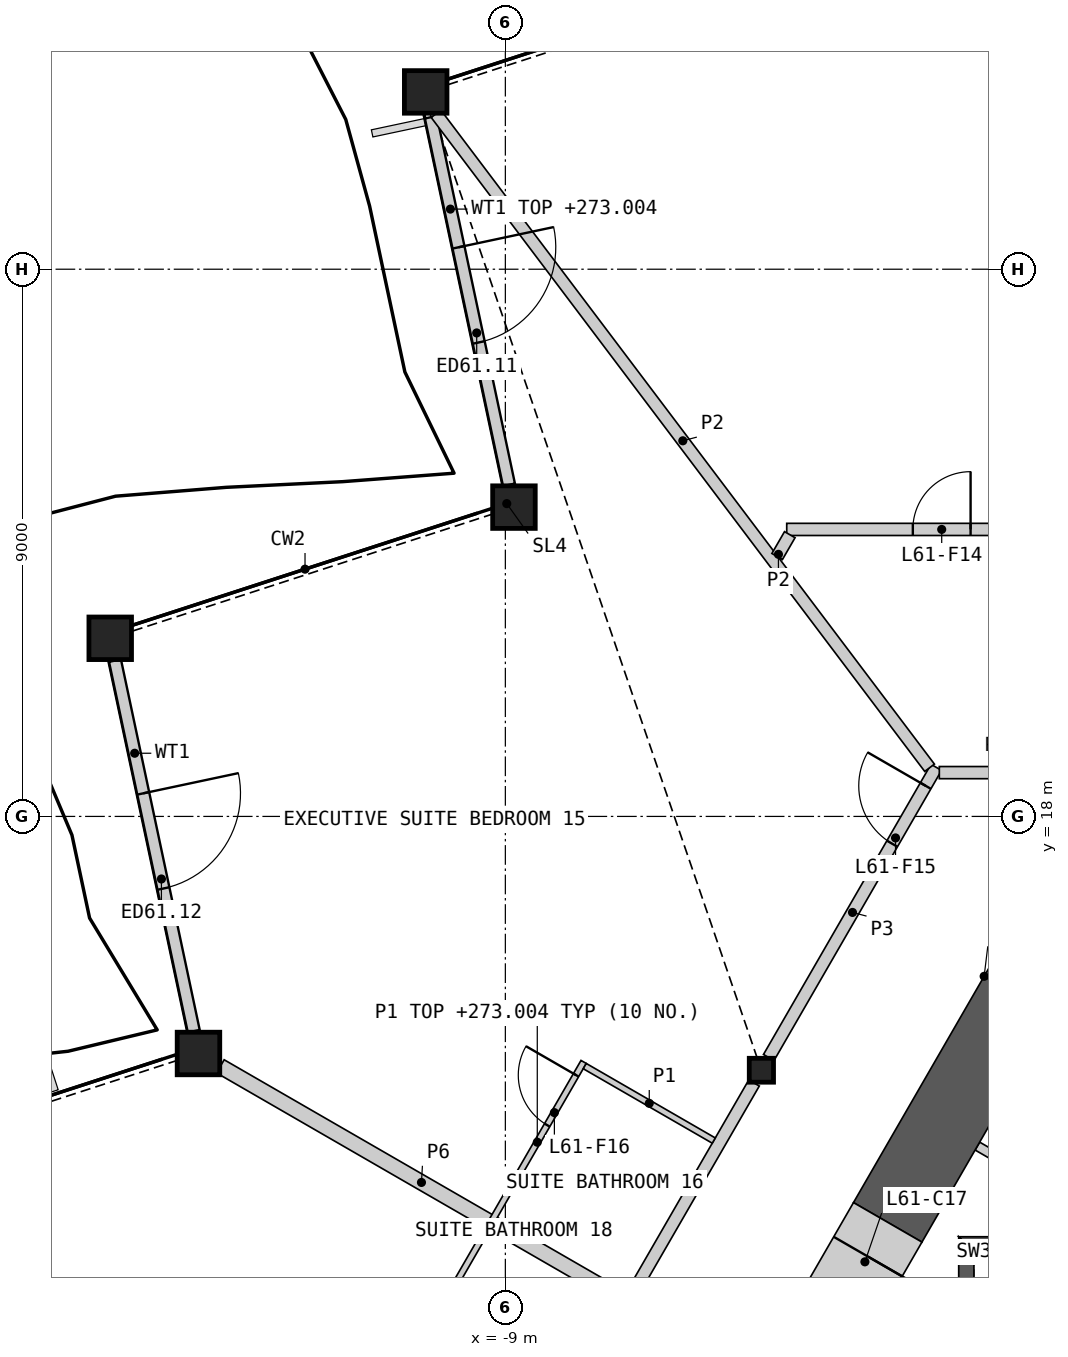
"""IFC4 building model, lengths in metres.
Left out: names, types, materials, properties, quantities, classifications, styles, units other than length and angle.
Written with IfcOpenShell. Run it as: python <this file> out.ifc"""

import sys

from ifc_helpers import new_model, si_unit, direction, frame, frame_2d, origin, origin_2d, place, context, subcontext, project, spatial, polyline, rectangle, hollow_rectangle, i_section, outline, extrude, element, fill, save


model = new_model("IFC4")
c1 = context("Model", 3, precision=1e-05, world=origin(), true_north=direction((0.0, 1.0)))
c2 = subcontext(c1, "Body", "Model", "MODEL_VIEW")
j1 = project(units=[si_unit("LENGTHUNIT", "METRE"), si_unit("PLANEANGLEUNIT", "RADIAN")], contexts=[c1])
p1 = place(None, origin())
s1 = spatial("IfcSite", under=j1, at=p1, CompositionType="ELEMENT")
p2 = place(p1, origin())
s2 = spatial("IfcBuilding", under=s1, at=p2, CompositionType="ELEMENT")
p3 = place(p2, frame((0.0, 0.0, 270.6)))
s3 = spatial("IfcBuildingStorey", under=s2, at=p3, CompositionType="ELEMENT", Elevation=270.6)
for number, where, z_axis, x_axis in (
    (1, (-10.31, 29.916, 0.0), (0.0, 0.0, 1.0), (1.0, 0.0, 0.0)),
    (2, (-8.859, 23.087, 0.0), (0.0, 0.0, 1.0), (1.0, 0.0, 0.0)),
    (3, (-15.499, 20.93, 0.0), (0.0, 0.0, 1.0), (1.0, 0.0, 0.0)),
    (4, (-14.047, 14.101, 0.0), (0.0, 0.0, 1.0), (1.0, 0.0, 0.0)),
):
    element("IfcColumn", number, at=place(p3, frame(where, z_axis=z_axis, x_axis=x_axis)), inside=s3, PredefinedType="COLUMN", context=c2, shape_type="SweptSolid", body=[
        extrude(hollow_rectangle(XDim=0.7, YDim=0.7, WallThickness=0.045, at=origin_2d()), origin(), (0.0, 0.0, 1.0), 3.6),
    ])
p4 = place(p3, frame((-4.789, 13.825, 0.0), z_axis=(0.0, 0.0, 1.0), x_axis=(1.0, 0.0, 0.0)))
e5 = element("IfcColumn", 5, at=p4, inside=s3, PredefinedType="COLUMN", context=c2, shape_type="SweptSolid", body=[
    extrude(i_section(OverallWidth=0.399, OverallDepth=0.393, WebThickness=0.023, FlangeThickness=0.037, at=origin_2d()), origin(), (0.0, 0.0, 1.0), 3.6),
])
p5 = place(p3, frame((-10.225, 29.5, 0.0), z_axis=(0.0, 0.0, 1.0), x_axis=(0.207897015768, -0.978150719897, 0.0)))
e6 = element("IfcWall", 6, at=p5, inside=s3, PredefinedType="SOLIDWALL", context=c2, shape_type="SweptSolid", body=[
    extrude(rectangle(XDim=6.182, YDim=0.2, at=frame_2d((3.091, 0.0))), origin(), (0.0, 0.0, 1.0), 2.404),
])
p6 = place(p5, frame((2.188, 0.0, 0.0)))
e7 = element("IfcOpeningElement", 7, at=p6, cuts=e6, PredefinedType="OPENING", context=c2, shape_type="SweptSolid", body=[
    extrude(rectangle(XDim=1.6, YDim=2.4, at=frame_2d((0.8, 1.2))), frame((0.0, 0.11, 0.0), z_axis=(0.0, -1.0, 0.0), x_axis=(1.0, 0.0, 0.0)), (0.0, 0.0, 1.0), 0.22),
])
p7 = place(p3, frame((-15.42, 20.563, 0.0), z_axis=(0.0, 0.0, 1.0), x_axis=(0.207907484076, -0.978148494895, 0.0)))
e8 = element("IfcWall", 8, at=p7, inside=s3, PredefinedType="SOLIDWALL", context=c2, shape_type="SweptSolid", body=[
    extrude(rectangle(XDim=6.232, YDim=0.2, at=frame_2d((3.116, 0.0))), origin(), (0.0, 0.0, 1.0), 2.701),
])
p8 = place(p7, frame((2.232, 0.0, 0.0)))
e9 = element("IfcOpeningElement", 9, at=p8, cuts=e8, PredefinedType="OPENING", context=c2, shape_type="SweptSolid", body=[
    extrude(rectangle(XDim=1.6, YDim=2.4, at=frame_2d((0.8, 1.2))), frame((0.0, 0.11, 0.0), z_axis=(0.0, -1.0, 0.0), x_axis=(1.0, 0.0, 0.0)), (0.0, 0.0, 1.0), 0.22),
])
p9 = place(p3, origin())
e10 = element("IfcWall", 10, at=p9, inside=s3, PredefinedType="SHEAR", context=c2, shape_type="SweptSolid", body=[
    extrude(outline(polyline([(1.544, 11.087), (-1.544, 11.087), (-1.294, 10.837), (1.294, 10.837), (1.544, 11.087)])), origin(), (0.0, 0.0, 1.0), 3.25),
])
p10 = place(p3, origin())
e11 = element("IfcWall", 11, at=p10, inside=s3, PredefinedType="SHEAR", context=c2, shape_type="SweptSolid", body=[
    extrude(outline(polyline([(-1.294, 10.837), (-1.544, 11.087), (-1.544, 5.237), (-1.294, 5.237), (-1.294, 10.837)])), origin(), (0.0, 0.0, 1.0), 3.25),
])
p11 = place(p3, frame((-1.237, 12.578, 0.0), z_axis=(0.0, 0.0, 1.0), x_axis=(0.866045649925, -0.499964931016, 0.0)))
e12 = element("IfcWall", 12, at=p11, inside=s3, PredefinedType="PARTITIONING", context=c2, shape_type="SweptSolid", body=[
    extrude(rectangle(XDim=2.992, YDim=0.15, at=frame_2d((1.496, 0.0))), origin(), (0.0, 0.0, 1.0), 3.25),
])
p12 = place(p3, frame((-0.563, 15.045, 0.0), z_axis=(0.0, 0.0, 1.0), x_axis=(-0.499994567278, -0.866028540345, 0.0)))
e13 = element("IfcWall", 13, at=p12, inside=s3, PredefinedType="SHEAR", context=c2, shape_type="SweptSolid", body=[
    extrude(rectangle(XDim=4.297, YDim=1.3, at=frame_2d((2.149, 0.0))), origin(), (0.0, 0.0, 1.0), 3.25),
])
p13 = place(p3, origin())
e14 = element("IfcWall", 14, at=p13, inside=s3, PredefinedType="SHEAR", context=c2, shape_type="SweptSolid", body=[
    extrude(outline(polyline([(-1.126, 15.371), (0.0, 17.321), (1.126, 15.371), (0.0, 14.72), (-1.126, 15.371)])), origin(), (0.0, 0.0, 1.0), 3.25),
])
p14 = place(p3, frame((-2.712, 11.324, 0.0), z_axis=(0.0, 0.0, 1.0), x_axis=(-0.499946605688, -0.86605622881, 0.0)))
e15 = element("IfcWall", 15, at=p14, inside=s3, PredefinedType="SHEAR", context=c2, shape_type="SweptSolid", body=[
    extrude(rectangle(XDim=2.2, YDim=1.3, at=frame_2d((1.1, 0.0))), origin(), (0.0, 0.0, 1.0), 3.25),
])
p15 = place(p14, frame((0.65, 0.0, 0.0)))
e16 = element("IfcOpeningElement", 16, at=p15, cuts=e15, PredefinedType="OPENING", context=c2, shape_type="SweptSolid", body=[
    extrude(rectangle(XDim=1.0, YDim=2.1, at=frame_2d((0.5, 1.05))), frame((0.0, 0.66, 0.0), z_axis=(0.0, -1.0, 0.0), x_axis=(1.0, 0.0, 0.0)), (0.0, 0.0, 1.0), 1.32),
])
p16 = place(p3, frame((-9.458, 5.74, 0.0), z_axis=(0.0, 0.0, 1.0), x_axis=(0.50000207303, 0.866024206917, 0.0)))
e17 = element("IfcWall", 17, at=p16, inside=s3, PredefinedType="PARTITIONING", context=c2, shape_type="SweptSolid", body=[
    extrude(rectangle(XDim=9.095, YDim=0.2, at=frame_2d((4.547, 0.0))), origin(), (0.0, 0.0, 1.0), 3.25),
])
p17 = place(p3, frame((-13.687, 13.889, 0.0), z_axis=(0.0, 0.0, 1.0), x_axis=(0.866041332704, -0.499972409287, 0.0)))
e18 = element("IfcWall", 18, at=p17, inside=s3, PredefinedType="PARTITIONING", context=c2, shape_type="SweptSolid", body=[
    extrude(rectangle(XDim=7.638, YDim=0.25, at=frame_2d((3.819, 0.0))), origin(), (0.0, 0.0, 1.0), 2.404),
])
p18 = place(p3, frame((-4.668, 14.035, 0.0), z_axis=(0.0, 0.0, 1.0), x_axis=(0.499984524817, 0.866034338201, 0.0)))
e19 = element("IfcWall", 19, at=p18, inside=s3, PredefinedType="PARTITIONING", context=c2, shape_type="SweptSolid", body=[
    extrude(rectangle(XDim=5.51, YDim=0.2, at=frame_2d((2.755, 0.0))), origin(), (0.0, 0.0, 1.0), 3.25),
])
p19 = place(p18, frame((4.06, 0.0, 0.0)))
e20 = element("IfcOpeningElement", 20, at=p19, cuts=e19, PredefinedType="OPENING", context=c2, shape_type="SweptSolid", body=[
    extrude(rectangle(XDim=1.1, YDim=2.1, at=frame_2d((0.55, 1.05))), frame((0.0, 0.11, 0.0), z_axis=(0.0, -1.0, 0.0), x_axis=(1.0, 0.0, 0.0)), (0.0, 0.0, 1.0), 0.22),
])
p20 = place(p3, frame((-1.863, 18.72, 0.0), z_axis=(0.0, 0.0, 1.0), x_axis=(1.0, 0.0, 0.0)))
e21 = element("IfcWall", 21, at=p20, inside=s3, PredefinedType="PARTITIONING", context=c2, shape_type="SweptSolid", body=[
    extrude(rectangle(XDim=3.726, YDim=0.2, at=frame_2d((1.863, 0.0))), origin(), (0.0, 0.0, 1.0), 3.25),
])
p21 = place(p20, frame((1.388, 0.0, 0.0)))
e22 = element("IfcOpeningElement", 22, at=p21, cuts=e21, PredefinedType="OPENING", context=c2, shape_type="SweptSolid", body=[
    extrude(rectangle(XDim=0.95, YDim=2.1, at=frame_2d((0.475, 1.05))), frame((0.0, 0.11, 0.0), z_axis=(0.0, -1.0, 0.0), x_axis=(1.0, 0.0, 0.0)), (0.0, 0.0, 1.0), 0.22),
])
p22 = place(p3, frame((-10.14, 29.556, 0.0), z_axis=(0.0, 0.0, 1.0), x_axis=(0.602360077041, -0.798224490721, 0.0)))
e23 = element("IfcWall", 23, at=p22, inside=s3, PredefinedType="PARTITIONING", context=c2, shape_type="SweptSolid", body=[
    extrude(rectangle(XDim=13.474, YDim=0.2, at=frame_2d((6.737, 0.0))), origin(), (0.0, 0.0, 1.0), 2.404),
])
p23 = place(p3, frame((-4.372, 22.72, 0.0), z_axis=(0.0, 0.0, 1.0), x_axis=(1.0, 0.0, 0.0)))
e24 = element("IfcWall", 24, at=p23, inside=s3, PredefinedType="PARTITIONING", context=c2, shape_type="SweptSolid", body=[
    extrude(rectangle(XDim=8.745, YDim=0.2, at=frame_2d((4.372, 0.0))), origin(), (0.0, 0.0, 1.0), 2.404),
])
p24 = place(p23, frame((2.074, 0.0, 0.0)))
e25 = element("IfcOpeningElement", 25, at=p24, cuts=e24, PredefinedType="OPENING", context=c2, shape_type="SweptSolid", body=[
    extrude(rectangle(XDim=0.95, YDim=2.1, at=frame_2d((0.475, 1.05))), frame((0.0, 0.11, 0.0), z_axis=(0.0, -1.0, 0.0), x_axis=(1.0, 0.0, 0.0)), (0.0, 0.0, 1.0), 0.22),
])
p25 = place(p3, frame((-4.53, 22.275, 0.0), z_axis=(0.0, 0.0, 1.0), x_axis=(0.499875358948, 0.866097353371, 0.0)))
e26 = element("IfcWall", 26, at=p25, inside=s3, PredefinedType="PARTITIONING", context=c2, shape_type="SweptSolid", body=[
    extrude(rectangle(XDim=0.415, YDim=0.2, at=frame_2d((0.207, 0.0))), origin(), (0.0, 0.0, 1.0), 2.404),
])
p26 = place(p3, frame((-10.762, 8.679, 0.0), z_axis=(0.0, 0.0, 1.0), x_axis=(0.500008851346, 0.866020293397, 0.0)))
e27 = element("IfcWall", 27, at=p26, inside=s3, PredefinedType="PARTITIONING", context=c2, shape_type="SweptSolid", body=[
    extrude(rectangle(XDim=6.1, YDim=0.1, at=frame_2d((3.05, 0.0))), origin(), (0.0, 0.0, 1.0), 2.404),
])
p27 = place(p26, frame((4.9, 0.0, 0.0)))
e28 = element("IfcOpeningElement", 28, at=p27, cuts=e27, PredefinedType="OPENING", context=c2, shape_type="SweptSolid", body=[
    extrude(rectangle(XDim=0.95, YDim=2.1, at=frame_2d((0.475, 1.05))), frame((0.0, 0.06, 0.0), z_axis=(0.0, -1.0, 0.0), x_axis=(1.0, 0.0, 0.0)), (0.0, 0.0, 1.0), 0.12),
])
p28 = place(p26, frame((0.25, 0.0, 0.0)))
e29 = element("IfcOpeningElement", 29, at=p28, cuts=e27, PredefinedType="OPENING", context=c2, shape_type="SweptSolid", body=[
    extrude(rectangle(XDim=0.95, YDim=2.1, at=frame_2d((0.475, 1.05))), frame((0.0, 0.06, 0.0), z_axis=(0.0, -1.0, 0.0), x_axis=(1.0, 0.0, 0.0)), (0.0, 0.0, 1.0), 0.12),
])
p29 = place(p3, frame((-7.694, 13.894, 0.0), z_axis=(0.0, 0.0, 1.0), x_axis=(0.865989751695, -0.500061746146, 0.0)))
e30 = element("IfcWall", 30, at=p29, inside=s3, PredefinedType="PARTITIONING", context=c2, shape_type="SweptSolid", body=[
    extrude(rectangle(XDim=2.45, YDim=0.1, at=frame_2d((1.225, 0.0))), origin(), (0.0, 0.0, 1.0), 2.404),
])
p30 = place(p6, origin())
e31 = element("IfcDoor", 31, at=p30, inside=s3, OperationType="DOUBLE_DOOR_SINGLE_SWING", PredefinedType="DOOR", context=c2, shape_type="SweptSolid", body=[
    extrude(rectangle(XDim=1.6, YDim=2.4, at=frame_2d((0.8, 1.2))), frame((0.0, 0.025, 0.0), z_axis=(0.0, -1.0, 0.0), x_axis=(1.0, 0.0, 0.0)), (0.0, 0.0, 1.0), 0.05),
])
fill(e7, e31)
p31 = place(p8, origin())
e32 = element("IfcDoor", 32, at=p31, inside=s3, OperationType="DOUBLE_DOOR_SINGLE_SWING", PredefinedType="DOOR", context=c2, shape_type="SweptSolid", body=[
    extrude(rectangle(XDim=1.6, YDim=2.4, at=frame_2d((0.8, 1.2))), frame((0.0, 0.025, 0.0), z_axis=(0.0, -1.0, 0.0), x_axis=(1.0, 0.0, 0.0)), (0.0, 0.0, 1.0), 0.05),
])
fill(e9, e32)
p32 = place(p15, origin())
e33 = element("IfcDoor", 33, at=p32, inside=s3, OperationType="SINGLE_SWING_LEFT", PredefinedType="DOOR", context=c2, shape_type="SweptSolid", body=[
    extrude(rectangle(XDim=1.0, YDim=2.1, at=frame_2d((0.5, 1.05))), frame((0.0, 0.405, 0.0), z_axis=(0.0, -1.0, 0.0), x_axis=(1.0, 0.0, 0.0)), (0.0, 0.0, 1.0), 0.05),
])
fill(e16, e33)
p33 = place(p24, origin())
e34 = element("IfcDoor", 34, at=p33, inside=s3, OperationType="SINGLE_SWING_RIGHT", PredefinedType="DOOR", context=c2, shape_type="SweptSolid", body=[
    extrude(rectangle(XDim=0.95, YDim=2.1, at=frame_2d((0.475, 1.05))), frame((0.0, 0.025, 0.0), z_axis=(0.0, -1.0, 0.0), x_axis=(1.0, 0.0, 0.0)), (0.0, 0.0, 1.0), 0.05),
])
fill(e25, e34)
p34 = place(p19, origin())
e35 = element("IfcDoor", 35, at=p34, inside=s3, OperationType="SINGLE_SWING_RIGHT", PredefinedType="DOOR", context=c2, shape_type="SweptSolid", body=[
    extrude(rectangle(XDim=1.1, YDim=2.1, at=frame_2d((0.55, 1.05))), frame((0.0, 0.025, 0.0), z_axis=(0.0, -1.0, 0.0), x_axis=(1.0, 0.0, 0.0)), (0.0, 0.0, 1.0), 0.05),
])
fill(e20, e35)
p35 = place(p27, origin())
e36 = element("IfcDoor", 36, at=p35, inside=s3, OperationType="SINGLE_SWING_RIGHT", PredefinedType="DOOR", context=c2, shape_type="SweptSolid", body=[
    extrude(rectangle(XDim=0.95, YDim=2.1, at=frame_2d((0.475, 1.05))), frame((0.0, 0.025, 0.0), z_axis=(0.0, -1.0, 0.0), x_axis=(1.0, 0.0, 0.0)), (0.0, 0.0, 1.0), 0.05),
])
fill(e28, e36)
save(model, sys.argv[1])
